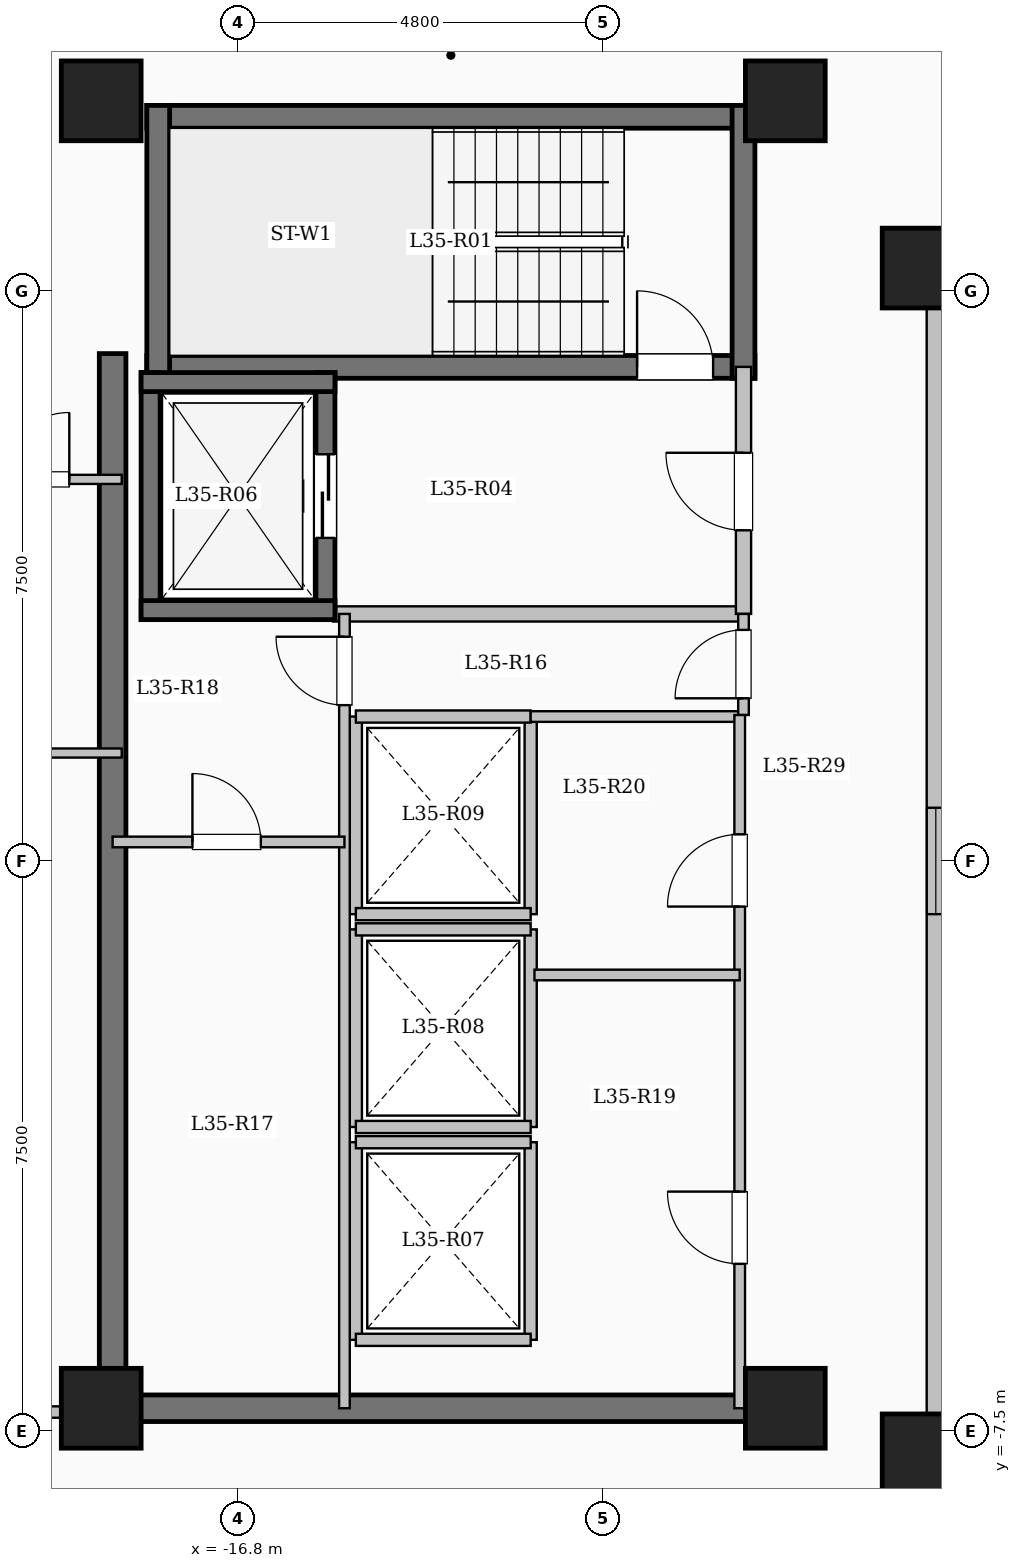
"""IFC4 building model, lengths in metres.
Left out: names, types, materials, properties, quantities, classifications, styles, units other than length and angle.
Written with IfcOpenShell. Run it as: python <this file> out.ifc"""

import sys

from ifc_helpers import new_model, si_unit, direction, frame, frame_2d, origin, origin_2d, place, context, subcontext, project, spatial, rectangle, extrude, element, fill, save


model = new_model("IFC4")
c1 = context("Model", 3, precision=1e-05, world=origin(), true_north=direction((0.0, 1.0)))
c2 = subcontext(c1, "Body", "Model", "MODEL_VIEW")
j1 = project(units=[si_unit("LENGTHUNIT", "METRE"), si_unit("PLANEANGLEUNIT", "RADIAN")], contexts=[c1])
p1 = place(None, origin())
s1 = spatial("IfcSite", under=j1, at=p1, CompositionType="ELEMENT")
p2 = place(p1, origin())
s2 = spatial("IfcBuilding", under=s1, at=p2, CompositionType="ELEMENT")
p3 = place(p2, frame((0.0, 0.0, 132.6)))
s3 = spatial("IfcBuildingStorey", under=s2, at=p3, CompositionType="ELEMENT", Elevation=132.6)
for number, where, z_axis, x_axis in (
    (1, (-7.8, -7.8, 0.0), (0.0, 0.0, 1.0), (1.0, 0.0, 0.0)),
    (2, (-7.8, 7.8, 0.0), (0.0, 0.0, 1.0), (1.0, 0.0, 0.0)),
    (3, (-9.6, -7.2, 0.0), (0.0, 0.0, 1.0), (1.0, 0.0, 0.0)),
    (4, (-9.6, 10.0, 0.0), (0.0, 0.0, 1.0), (1.0, 0.0, 0.0)),
    (5, (-18.6, -7.2, 0.0), (0.0, 0.0, 1.0), (1.0, 0.0, 0.0)),
    (6, (-18.6, 10.0, 0.0), (0.0, 0.0, 1.0), (1.0, 0.0, 0.0)),
):
    element("IfcColumn", number, at=place(p3, frame(where, z_axis=z_axis, x_axis=x_axis)), inside=s3, PredefinedType="COLUMN", context=c2, shape_type="SweptSolid", body=[
        extrude(rectangle(XDim=1.05, YDim=1.05, at=origin_2d()), origin(), (0.0, 0.0, 1.0), 3.35),
    ])
p4 = place(p3, frame((-7.62, -7.62, 0.0), z_axis=(0.0, 0.0, 1.0), x_axis=(1.0, 0.0, 0.0)))
e7 = element("IfcWall", 7, at=p4, inside=s3, PredefinedType="SOLIDWALL", context=c2, shape_type="SweptSolid", body=[
    extrude(rectangle(XDim=15.24, YDim=0.24, at=frame_2d((7.62, 0.0))), origin(), (0.0, 0.0, 1.0), 3.1),
])
p5 = place(p4, frame((6.92, 0.0, 0.95)))
e8 = element("IfcOpeningElement", 8, at=p5, cuts=e7, PredefinedType="OPENING", context=c2, shape_type="SweptSolid", body=[
    extrude(rectangle(XDim=1.4, YDim=1.5, at=frame_2d((0.7, 0.75))), frame((0.0, 0.13, 0.0), z_axis=(0.0, -1.0, 0.0), x_axis=(1.0, 0.0, 0.0)), (0.0, 0.0, 1.0), 0.26),
])
p6 = place(p3, frame((7.62, 7.62, 0.0), z_axis=(0.0, 0.0, 1.0), x_axis=(-1.0, 0.0, 0.0)))
e9 = element("IfcWall", 9, at=p6, inside=s3, PredefinedType="SOLIDWALL", context=c2, shape_type="SweptSolid", body=[
    extrude(rectangle(XDim=15.24, YDim=0.24, at=frame_2d((7.62, 0.0))), origin(), (0.0, 0.0, 1.0), 3.1),
])
p7 = place(p6, frame((6.92, 0.0, 0.95)))
e10 = element("IfcOpeningElement", 10, at=p7, cuts=e9, PredefinedType="OPENING", context=c2, shape_type="SweptSolid", body=[
    extrude(rectangle(XDim=1.4, YDim=1.5, at=frame_2d((0.7, 0.75))), frame((0.0, 0.13, 0.0), z_axis=(0.0, -1.0, 0.0), x_axis=(1.0, 0.0, 0.0)), (0.0, 0.0, 1.0), 0.26),
])
p8 = place(p3, frame((-7.62, 7.62, 0.0), z_axis=(0.0, 0.0, 1.0), x_axis=(0.0, -1.0, 0.0)))
e11 = element("IfcWall", 11, at=p8, inside=s3, PredefinedType="SOLIDWALL", context=c2, shape_type="SweptSolid", body=[
    extrude(rectangle(XDim=15.24, YDim=0.24, at=frame_2d((7.62, 0.0))), origin(), (0.0, 0.0, 1.0), 3.1),
])
p9 = place(p8, frame((6.92, 0.0, 0.95)))
e12 = element("IfcOpeningElement", 12, at=p9, cuts=e11, PredefinedType="OPENING", context=c2, shape_type="SweptSolid", body=[
    extrude(rectangle(XDim=1.4, YDim=1.5, at=frame_2d((0.7, 0.75))), frame((0.0, 0.13, 0.0), z_axis=(0.0, -1.0, 0.0), x_axis=(1.0, 0.0, 0.0)), (0.0, 0.0, 1.0), 0.26),
])
p10 = place(p3, frame((-18.0, 9.79, 0.0), z_axis=(0.0, 0.0, 1.0), x_axis=(1.0, 0.0, 0.0)))
e13 = element("IfcWall", 13, at=p10, inside=s3, PredefinedType="SHEAR", context=c2, shape_type="SweptSolid", body=[
    extrude(rectangle(XDim=8.0, YDim=0.3, at=frame_2d((4.0, 0.0))), origin(), (0.0, 0.0, 1.0), 3.35),
])
p11 = place(p3, frame((-18.0, 6.5, 0.0), z_axis=(0.0, 0.0, 1.0), x_axis=(1.0, 0.0, 0.0)))
e14 = element("IfcWall", 14, at=p11, inside=s3, PredefinedType="SHEAR", context=c2, shape_type="SweptSolid", body=[
    extrude(rectangle(XDim=8.0, YDim=0.3, at=frame_2d((4.0, 0.0))), origin(), (0.0, 0.0, 1.0), 3.35),
])
p12 = place(p11, frame((6.45, 0.0, 0.0)))
e15 = element("IfcOpeningElement", 15, at=p12, cuts=e14, PredefinedType="OPENING", context=c2, shape_type="SweptSolid", body=[
    extrude(rectangle(XDim=1.0, YDim=2.15, at=frame_2d((0.5, 1.075))), frame((0.0, 0.16, 0.0), z_axis=(0.0, -1.0, 0.0), x_axis=(1.0, 0.0, 0.0)), (0.0, 0.0, 1.0), 0.32),
])
for number, where, z_axis, x_axis in (
    (16, (-17.85, 6.35, 0.0), (0.0, 0.0, 1.0), (0.0, 1.0, 0.0)),
    (17, (-10.15, 6.35, 0.0), (0.0, 0.0, 1.0), (0.0, 1.0, 0.0)),
):
    element("IfcWall", number, at=place(p3, frame(where, z_axis=z_axis, x_axis=x_axis)), inside=s3, PredefinedType="SHEAR", context=c2, shape_type="SweptSolid", body=[
        extrude(rectangle(XDim=3.59, YDim=0.3, at=frame_2d((1.795, 0.0))), origin(), (0.0, 0.0, 1.0), 3.35),
    ])
p13 = place(p3, frame((-15.55, 3.25, 0.0), z_axis=(0.0, 0.0, 1.0), x_axis=(1.0, 0.0, 0.0)))
e18 = element("IfcWall", 18, at=p13, inside=s3, PredefinedType="SOLIDWALL", context=c2, shape_type="SweptSolid", body=[
    extrude(rectangle(XDim=5.4, YDim=0.2, at=frame_2d((2.7, 0.0))), origin(), (0.0, 0.0, 1.0), 3.1),
])
p14 = place(p3, frame((-10.15, 3.25, 0.0), z_axis=(0.0, 0.0, 1.0), x_axis=(0.0, 1.0, 0.0)))
e19 = element("IfcWall", 19, at=p14, inside=s3, PredefinedType="SOLIDWALL", context=c2, shape_type="SweptSolid", body=[
    extrude(rectangle(XDim=3.25, YDim=0.2, at=frame_2d((1.625, 0.0))), origin(), (0.0, 0.0, 1.0), 3.1),
])
p15 = place(p14, frame((1.1, 0.0, 0.0)))
e20 = element("IfcOpeningElement", 20, at=p15, cuts=e19, PredefinedType="OPENING", context=c2, shape_type="SweptSolid", body=[
    extrude(rectangle(XDim=1.02, YDim=2.15, at=frame_2d((0.51, 1.075))), frame((0.0, 0.11, 0.0), z_axis=(0.0, -1.0, 0.0), x_axis=(1.0, 0.0, 0.0)), (0.0, 0.0, 1.0), 0.22),
])
p16 = place(p3, frame((-17.95, 3.175, 0.0), z_axis=(0.0, 0.0, 1.0), x_axis=(0.0, 1.0, 0.0)))
e21 = element("IfcWall", 21, at=p16, inside=s3, PredefinedType="SHEAR", context=c2, shape_type="SweptSolid", body=[
    extrude(rectangle(XDim=3.25, YDim=0.25, at=frame_2d((1.625, 0.0))), origin(), (0.0, 0.0, 1.0), 3.35),
])
p17 = place(p3, frame((-15.65, 3.175, 0.0), z_axis=(0.0, 0.0, 1.0), x_axis=(0.0, 1.0, 0.0)))
e22 = element("IfcWall", 22, at=p17, inside=s3, PredefinedType="SHEAR", context=c2, shape_type="SweptSolid", body=[
    extrude(rectangle(XDim=3.25, YDim=0.25, at=frame_2d((1.625, 0.0))), origin(), (0.0, 0.0, 1.0), 3.35),
])
p18 = place(p17, frame((1.075, 0.0, 0.0)))
e23 = element("IfcOpeningElement", 23, at=p18, cuts=e22, PredefinedType="OPENING", context=c2, shape_type="SweptSolid", body=[
    extrude(rectangle(XDim=1.1, YDim=2.15, at=frame_2d((0.55, 1.075))), frame((0.0, 0.135, 0.0), z_axis=(0.0, -1.0, 0.0), x_axis=(1.0, 0.0, 0.0)), (0.0, 0.0, 1.0), 0.27),
])
for number, where, z_axis, x_axis in (
    (24, (-18.075, 3.3, 0.0), (0.0, 0.0, 1.0), (1.0, 0.0, 0.0)),
    (25, (-18.075, 6.3, 0.0), (0.0, 0.0, 1.0), (1.0, 0.0, 0.0)),
):
    element("IfcWall", number, at=place(p3, frame(where, z_axis=z_axis, x_axis=x_axis)), inside=s3, PredefinedType="SHEAR", context=c2, shape_type="SweptSolid", body=[
        extrude(rectangle(XDim=2.55, YDim=0.25, at=frame_2d((1.275, 0.0))), origin(), (0.0, 0.0, 1.0), 3.35),
    ])
for number, where, z_axis, x_axis in (
    (26, (-15.25, -6.3, 0.0), (0.0, 0.0, 1.0), (0.0, 1.0, 0.0)),
    (27, (-12.95, -6.3, 0.0), (0.0, 0.0, 1.0), (0.0, 1.0, 0.0)),
):
    element("IfcWall", number, at=place(p3, frame(where, z_axis=z_axis, x_axis=x_axis)), inside=s3, PredefinedType="SOLIDWALL", context=c2, shape_type="SweptSolid", body=[
        extrude(rectangle(XDim=2.6, YDim=0.16, at=frame_2d((1.3, 0.0))), origin(), (0.0, 0.0, 1.0), 3.1),
    ])
for number, where, z_axis, x_axis in (
    (28, (-15.25, -6.3, 0.0), (0.0, 0.0, 1.0), (1.0, 0.0, 0.0)),
    (29, (-15.25, -3.7, 0.0), (0.0, 0.0, 1.0), (1.0, 0.0, 0.0)),
):
    element("IfcWall", number, at=place(p3, frame(where, z_axis=z_axis, x_axis=x_axis)), inside=s3, PredefinedType="SOLIDWALL", context=c2, shape_type="SweptSolid", body=[
        extrude(rectangle(XDim=2.3, YDim=0.16, at=frame_2d((1.15, 0.0))), origin(), (0.0, 0.0, 1.0), 3.1),
    ])
for number, where, z_axis, x_axis in (
    (30, (-15.25, -3.5, 0.0), (0.0, 0.0, 1.0), (0.0, 1.0, 0.0)),
    (31, (-12.95, -3.5, 0.0), (0.0, 0.0, 1.0), (0.0, 1.0, 0.0)),
):
    element("IfcWall", number, at=place(p3, frame(where, z_axis=z_axis, x_axis=x_axis)), inside=s3, PredefinedType="SOLIDWALL", context=c2, shape_type="SweptSolid", body=[
        extrude(rectangle(XDim=2.6, YDim=0.16, at=frame_2d((1.3, 0.0))), origin(), (0.0, 0.0, 1.0), 3.1),
    ])
for number, where, z_axis, x_axis in (
    (32, (-15.25, -3.5, 0.0), (0.0, 0.0, 1.0), (1.0, 0.0, 0.0)),
    (33, (-15.25, -0.9, 0.0), (0.0, 0.0, 1.0), (1.0, 0.0, 0.0)),
):
    element("IfcWall", number, at=place(p3, frame(where, z_axis=z_axis, x_axis=x_axis)), inside=s3, PredefinedType="SOLIDWALL", context=c2, shape_type="SweptSolid", body=[
        extrude(rectangle(XDim=2.3, YDim=0.16, at=frame_2d((1.15, 0.0))), origin(), (0.0, 0.0, 1.0), 3.1),
    ])
for number, where, z_axis, x_axis in (
    (34, (-15.25, -0.7, 0.0), (0.0, 0.0, 1.0), (0.0, 1.0, 0.0)),
    (35, (-12.95, -0.7, 0.0), (0.0, 0.0, 1.0), (0.0, 1.0, 0.0)),
):
    element("IfcWall", number, at=place(p3, frame(where, z_axis=z_axis, x_axis=x_axis)), inside=s3, PredefinedType="SOLIDWALL", context=c2, shape_type="SweptSolid", body=[
        extrude(rectangle(XDim=2.6, YDim=0.16, at=frame_2d((1.3, 0.0))), origin(), (0.0, 0.0, 1.0), 3.1),
    ])
for number, where, z_axis, x_axis in (
    (36, (-15.25, -0.7, 0.0), (0.0, 0.0, 1.0), (1.0, 0.0, 0.0)),
    (37, (-15.25, 1.9, 0.0), (0.0, 0.0, 1.0), (1.0, 0.0, 0.0)),
):
    element("IfcWall", number, at=place(p3, frame(where, z_axis=z_axis, x_axis=x_axis)), inside=s3, PredefinedType="SOLIDWALL", context=c2, shape_type="SweptSolid", body=[
        extrude(rectangle(XDim=2.3, YDim=0.16, at=frame_2d((1.15, 0.0))), origin(), (0.0, 0.0, 1.0), 3.1),
    ])
p19 = place(p3, frame((-18.45, -7.375, 0.0), z_axis=(0.0, 0.0, 1.0), x_axis=(0.0, 1.0, 0.0)))
e38 = element("IfcWall", 38, at=p19, inside=s3, PredefinedType="SHEAR", context=c2, shape_type="SweptSolid", body=[
    extrude(rectangle(XDim=14.05, YDim=0.35, at=frame_2d((7.025, 0.0))), origin(), (0.0, 0.0, 1.0), 3.35),
])
p20 = place(p3, frame((-18.625, -7.2, 0.0), z_axis=(0.0, 0.0, 1.0), x_axis=(1.0, 0.0, 0.0)))
e39 = element("IfcWall", 39, at=p20, inside=s3, PredefinedType="SHEAR", context=c2, shape_type="SweptSolid", body=[
    extrude(rectangle(XDim=8.55, YDim=0.35, at=frame_2d((4.275, 0.0))), origin(), (0.0, 0.0, 1.0), 3.35),
])
p21 = place(p3, frame((-12.95, 1.9, 0.0), z_axis=(0.0, 0.0, 1.0), x_axis=(1.0, 0.0, 0.0)))
e40 = element("IfcWall", 40, at=p21, inside=s3, PredefinedType="PARTITIONING", context=c2, shape_type="SweptSolid", body=[
    extrude(rectangle(XDim=2.8, YDim=0.14, at=frame_2d((1.4, 0.0))), origin(), (0.0, 0.0, 1.0), 3.1),
])
p22 = place(p3, frame((-10.15, 1.92, 0.0), z_axis=(0.0, 0.0, 1.0), x_axis=(0.0, 1.0, 0.0)))
e41 = element("IfcWall", 41, at=p22, inside=s3, PredefinedType="PARTITIONING", context=c2, shape_type="SweptSolid", body=[
    extrude(rectangle(XDim=1.33, YDim=0.14, at=frame_2d((0.665, 0.0))), origin(), (0.0, 0.0, 1.0), 3.1),
])
p23 = place(p22, frame((0.22, 0.0, 0.0)))
e42 = element("IfcOpeningElement", 42, at=p23, cuts=e41, PredefinedType="OPENING", context=c2, shape_type="SweptSolid", body=[
    extrude(rectangle(XDim=0.9, YDim=2.08, at=frame_2d((0.45, 1.04))), frame((0.0, 0.08, 0.0), z_axis=(0.0, -1.0, 0.0), x_axis=(1.0, 0.0, 0.0)), (0.0, 0.0, 1.0), 0.16),
])
p24 = place(p3, frame((-15.4, -7.2, 0.0), z_axis=(0.0, 0.0, 1.0), x_axis=(0.0, 1.0, 0.0)))
e43 = element("IfcWall", 43, at=p24, inside=s3, PredefinedType="PARTITIONING", context=c2, shape_type="SweptSolid", body=[
    extrude(rectangle(XDim=10.45, YDim=0.14, at=frame_2d((5.225, 0.0))), origin(), (0.0, 0.0, 1.0), 3.1),
])
p25 = place(p24, frame((9.25, 0.0, 0.0)))
e44 = element("IfcOpeningElement", 44, at=p25, cuts=e43, PredefinedType="OPENING", context=c2, shape_type="SweptSolid", body=[
    extrude(rectangle(XDim=0.9, YDim=2.08, at=frame_2d((0.45, 1.04))), frame((0.0, 0.08, 0.0), z_axis=(0.0, -1.0, 0.0), x_axis=(1.0, 0.0, 0.0)), (0.0, 0.0, 1.0), 0.16),
])
p26 = place(p3, frame((-18.45, 0.25, 0.0), z_axis=(0.0, 0.0, 1.0), x_axis=(1.0, 0.0, 0.0)))
e45 = element("IfcWall", 45, at=p26, inside=s3, PredefinedType="PARTITIONING", context=c2, shape_type="SweptSolid", body=[
    extrude(rectangle(XDim=3.05, YDim=0.14, at=frame_2d((1.525, 0.0))), origin(), (0.0, 0.0, 1.0), 3.1),
])
p27 = place(p26, frame((1.05, 0.0, 0.0)))
e46 = element("IfcOpeningElement", 46, at=p27, cuts=e45, PredefinedType="OPENING", context=c2, shape_type="SweptSolid", body=[
    extrude(rectangle(XDim=0.9, YDim=2.08, at=frame_2d((0.45, 1.04))), frame((0.0, 0.08, 0.0), z_axis=(0.0, -1.0, 0.0), x_axis=(1.0, 0.0, 0.0)), (0.0, 0.0, 1.0), 0.16),
])
p28 = place(p3, frame((-10.2, -7.2, 0.0), z_axis=(0.0, 0.0, 1.0), x_axis=(0.0, 1.0, 0.0)))
e47 = element("IfcWall", 47, at=p28, inside=s3, PredefinedType="PARTITIONING", context=c2, shape_type="SweptSolid", body=[
    extrude(rectangle(XDim=9.12, YDim=0.14, at=frame_2d((4.56, 0.0))), origin(), (0.0, 0.0, 1.0), 3.1),
])
p29 = place(p28, frame((1.9, 0.0, 0.0)))
e48 = element("IfcOpeningElement", 48, at=p29, cuts=e47, PredefinedType="OPENING", context=c2, shape_type="SweptSolid", body=[
    extrude(rectangle(XDim=0.95, YDim=2.12, at=frame_2d((0.475, 1.06))), frame((0.0, 0.08, 0.0), z_axis=(0.0, -1.0, 0.0), x_axis=(1.0, 0.0, 0.0)), (0.0, 0.0, 1.0), 0.16),
])
p30 = place(p28, frame((6.6, 0.0, 0.0)))
e49 = element("IfcOpeningElement", 49, at=p30, cuts=e47, PredefinedType="OPENING", context=c2, shape_type="SweptSolid", body=[
    extrude(rectangle(XDim=0.95, YDim=2.12, at=frame_2d((0.475, 1.06))), frame((0.0, 0.08, 0.0), z_axis=(0.0, -1.0, 0.0), x_axis=(1.0, 0.0, 0.0)), (0.0, 0.0, 1.0), 0.16),
])
p31 = place(p3, frame((-12.9, -1.5, 0.0), z_axis=(0.0, 0.0, 1.0), x_axis=(1.0, 0.0, 0.0)))
e50 = element("IfcWall", 50, at=p31, inside=s3, PredefinedType="PARTITIONING", context=c2, shape_type="SweptSolid", body=[
    extrude(rectangle(XDim=2.7, YDim=0.14, at=frame_2d((1.35, 0.0))), origin(), (0.0, 0.0, 1.0), 3.1),
])
p32 = place(p3, frame((-25.08, -7.25, 0.0), z_axis=(0.0, 0.0, 1.0), x_axis=(1.0, 0.0, 0.0)))
e51 = element("IfcWall", 51, at=p32, inside=s3, PredefinedType="PARTITIONING", context=c2, shape_type="SweptSolid", body=[
    extrude(rectangle(XDim=6.63, YDim=0.15, at=frame_2d((3.315, 0.0))), origin(), (0.0, 0.0, 1.0), 3.1),
])
p33 = place(p32, frame((3.53, 0.0, 0.0)))
e52 = element("IfcOpeningElement", 52, at=p33, cuts=e51, PredefinedType="OPENING", context=c2, shape_type="SweptSolid", body=[
    extrude(rectangle(XDim=0.96, YDim=2.15, at=frame_2d((0.48, 1.075))), frame((0.0, 0.085, 0.0), z_axis=(0.0, -1.0, 0.0), x_axis=(1.0, 0.0, 0.0)), (0.0, 0.0, 1.0), 0.17),
])
p34 = place(p3, frame((-25.2, 1.42, 0.0), z_axis=(0.0, 0.0, 1.0), x_axis=(1.0, 0.0, 0.0)))
e53 = element("IfcWall", 53, at=p34, inside=s3, PredefinedType="PARTITIONING", context=c2, shape_type="SweptSolid", body=[
    extrude(rectangle(XDim=6.87, YDim=0.12, at=frame_2d((3.435, 0.0))), origin(), (0.0, 0.0, 1.0), 3.1),
])
p35 = place(p34, frame((1.312, 0.0, 0.0)))
e54 = element("IfcOpeningElement", 54, at=p35, cuts=e53, PredefinedType="OPENING", context=c2, shape_type="SweptSolid", body=[
    extrude(rectangle(XDim=0.88, YDim=2.1, at=frame_2d((0.44, 1.05))), frame((0.0, 0.07, 0.0), z_axis=(0.0, -1.0, 0.0), x_axis=(1.0, 0.0, 0.0)), (0.0, 0.0, 1.0), 0.14),
])
p36 = place(p34, frame((4.577, 0.0, 0.0)))
e55 = element("IfcOpeningElement", 55, at=p36, cuts=e53, PredefinedType="OPENING", context=c2, shape_type="SweptSolid", body=[
    extrude(rectangle(XDim=0.88, YDim=2.1, at=frame_2d((0.44, 1.05))), frame((0.0, 0.07, 0.0), z_axis=(0.0, -1.0, 0.0), x_axis=(1.0, 0.0, 0.0)), (0.0, 0.0, 1.0), 0.14),
])
p37 = place(p3, frame((-25.2, 5.02, 0.0), z_axis=(0.0, 0.0, 1.0), x_axis=(1.0, 0.0, 0.0)))
e56 = element("IfcWall", 56, at=p37, inside=s3, PredefinedType="PARTITIONING", context=c2, shape_type="SweptSolid", body=[
    extrude(rectangle(XDim=6.87, YDim=0.12, at=frame_2d((3.435, 0.0))), origin(), (0.0, 0.0, 1.0), 3.1),
])
p38 = place(p37, frame((5.3, 0.0, 0.0)))
e57 = element("IfcOpeningElement", 57, at=p38, cuts=e56, PredefinedType="OPENING", context=c2, shape_type="SweptSolid", body=[
    extrude(rectangle(XDim=0.88, YDim=2.1, at=frame_2d((0.44, 1.05))), frame((0.0, 0.07, 0.0), z_axis=(0.0, -1.0, 0.0), x_axis=(1.0, 0.0, 0.0)), (0.0, 0.0, 1.0), 0.14),
])
p39 = place(p9, origin())
e58 = element("IfcWindow", 58, at=p39, inside=s3, PartitioningType="SINGLE_PANEL", PredefinedType="WINDOW", context=c2, shape_type="SweptSolid", body=[
    extrude(rectangle(XDim=1.4, YDim=1.5, at=frame_2d((0.7, 0.75))), frame((0.0, 0.03, 0.0), z_axis=(0.0, -1.0, 0.0), x_axis=(1.0, 0.0, 0.0)), (0.0, 0.0, 1.0), 0.06),
])
fill(e12, e58)
p40 = place(p12, origin())
e59 = element("IfcDoor", 59, at=p40, inside=s3, OperationType="SINGLE_SWING_LEFT", PredefinedType="DOOR", context=c2, shape_type="SweptSolid", body=[
    extrude(rectangle(XDim=1.0, YDim=2.15, at=frame_2d((0.5, 1.075))), frame((0.0, 0.025, 0.0), z_axis=(0.0, -1.0, 0.0), x_axis=(1.0, 0.0, 0.0)), (0.0, 0.0, 1.0), 0.05),
])
fill(e15, e59)
p41 = place(p15, origin())
e60 = element("IfcDoor", 60, at=p41, inside=s3, OperationType="SINGLE_SWING_RIGHT", PredefinedType="DOOR", context=c2, shape_type="SweptSolid", body=[
    extrude(rectangle(XDim=1.02, YDim=2.15, at=frame_2d((0.51, 1.075))), frame((0.0, 0.025, 0.0), z_axis=(0.0, -1.0, 0.0), x_axis=(1.0, 0.0, 0.0)), (0.0, 0.0, 1.0), 0.05),
])
fill(e20, e60)
p42 = place(p18, origin())
e61 = element("IfcDoor", 61, at=p42, inside=s3, OperationType="SLIDING_TO_LEFT", PredefinedType="DOOR", context=c2, shape_type="SweptSolid", body=[
    extrude(rectangle(XDim=1.1, YDim=2.15, at=frame_2d((0.55, 1.075))), frame((0.0, 0.025, 0.0), z_axis=(0.0, -1.0, 0.0), x_axis=(1.0, 0.0, 0.0)), (0.0, 0.0, 1.0), 0.05),
])
fill(e23, e61)
p43 = place(p23, origin())
e62 = element("IfcDoor", 62, at=p43, inside=s3, OperationType="SINGLE_SWING_LEFT", PredefinedType="DOOR", context=c2, shape_type="SweptSolid", body=[
    extrude(rectangle(XDim=0.9, YDim=2.08, at=frame_2d((0.45, 1.04))), frame((0.0, 0.025, 0.0), z_axis=(0.0, -1.0, 0.0), x_axis=(1.0, 0.0, 0.0)), (0.0, 0.0, 1.0), 0.05),
])
fill(e42, e62)
p44 = place(p25, origin())
e63 = element("IfcDoor", 63, at=p44, inside=s3, OperationType="SINGLE_SWING_RIGHT", PredefinedType="DOOR", context=c2, shape_type="SweptSolid", body=[
    extrude(rectangle(XDim=0.9, YDim=2.08, at=frame_2d((0.45, 1.04))), frame((0.0, 0.025, 0.0), z_axis=(0.0, -1.0, 0.0), x_axis=(1.0, 0.0, 0.0)), (0.0, 0.0, 1.0), 0.05),
])
fill(e44, e63)
p45 = place(p27, origin())
e64 = element("IfcDoor", 64, at=p45, inside=s3, OperationType="SINGLE_SWING_LEFT", PredefinedType="DOOR", context=c2, shape_type="SweptSolid", body=[
    extrude(rectangle(XDim=0.9, YDim=2.08, at=frame_2d((0.45, 1.04))), frame((0.0, 0.025, 0.0), z_axis=(0.0, -1.0, 0.0), x_axis=(1.0, 0.0, 0.0)), (0.0, 0.0, 1.0), 0.05),
])
fill(e46, e64)
p46 = place(p29, origin())
e65 = element("IfcDoor", 65, at=p46, inside=s3, OperationType="SINGLE_SWING_RIGHT", PredefinedType="DOOR", context=c2, shape_type="SweptSolid", body=[
    extrude(rectangle(XDim=0.95, YDim=2.12, at=frame_2d((0.475, 1.06))), frame((0.0, 0.025, 0.0), z_axis=(0.0, -1.0, 0.0), x_axis=(1.0, 0.0, 0.0)), (0.0, 0.0, 1.0), 0.05),
])
fill(e48, e65)
p47 = place(p30, origin())
e66 = element("IfcDoor", 66, at=p47, inside=s3, OperationType="SINGLE_SWING_LEFT", PredefinedType="DOOR", context=c2, shape_type="SweptSolid", body=[
    extrude(rectangle(XDim=0.95, YDim=2.12, at=frame_2d((0.475, 1.06))), frame((0.0, 0.025, 0.0), z_axis=(0.0, -1.0, 0.0), x_axis=(1.0, 0.0, 0.0)), (0.0, 0.0, 1.0), 0.05),
])
fill(e49, e66)
p48 = place(p38, origin())
e67 = element("IfcDoor", 67, at=p48, inside=s3, OperationType="SINGLE_SWING_RIGHT", PredefinedType="DOOR", context=c2, shape_type="SweptSolid", body=[
    extrude(rectangle(XDim=0.88, YDim=2.1, at=frame_2d((0.44, 1.05))), frame((0.0, 0.025, 0.0), z_axis=(0.0, -1.0, 0.0), x_axis=(1.0, 0.0, 0.0)), (0.0, 0.0, 1.0), 0.05),
])
fill(e57, e67)
save(model, sys.argv[1])
